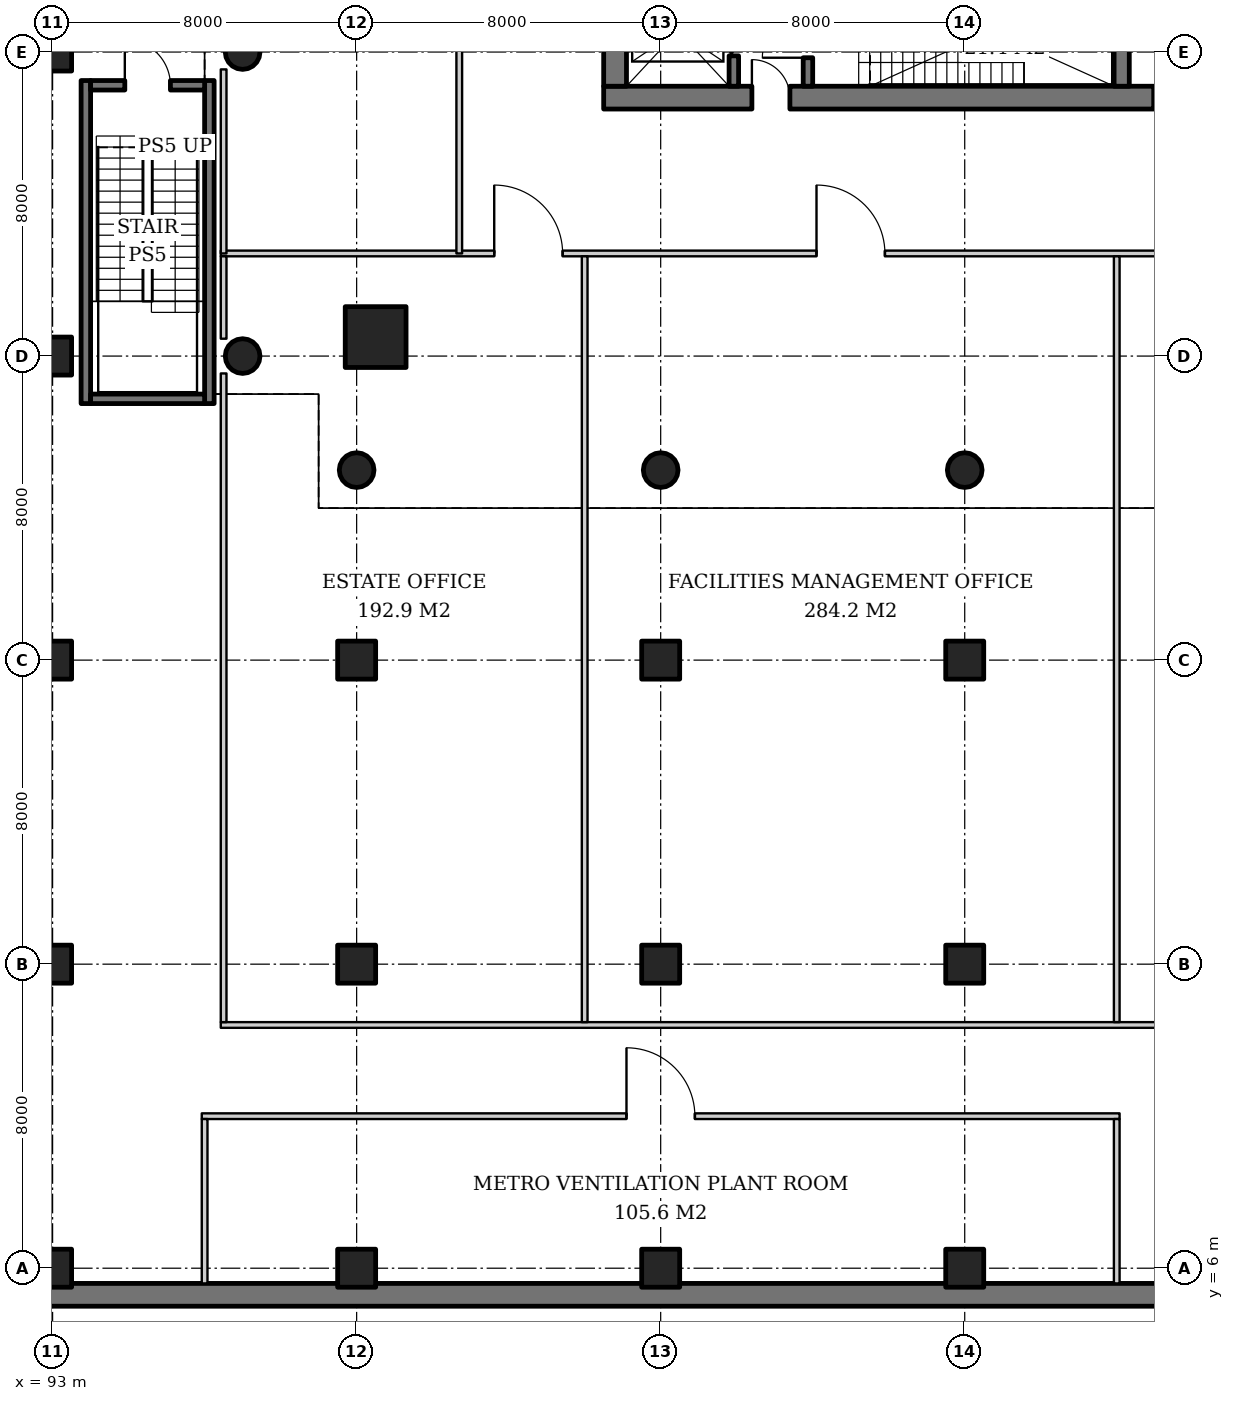
"""IFC4 building model, lengths in metres.
Left out: names, types, materials, properties, quantities, classifications, styles, units other than length and angle.
Written with IfcOpenShell. Run it as: python <this file> out.ifc"""

import sys

from ifc_helpers import new_model, si_unit, direction, frame, frame_2d, origin, origin_2d, place, context, subcontext, project, spatial, rectangle, hollow_circle, extrude, element, fill, save


model = new_model("IFC4")
c1 = context("Model", 3, precision=1e-05, world=origin(), true_north=direction((0.0, 1.0)))
c2 = subcontext(c1, "Body", "Model", "MODEL_VIEW")
j1 = project(units=[si_unit("LENGTHUNIT", "METRE"), si_unit("PLANEANGLEUNIT", "RADIAN")], contexts=[c1])
p1 = place(None, origin())
s1 = spatial("IfcSite", under=j1, at=p1, CompositionType="ELEMENT")
p2 = place(p1, origin())
s2 = spatial("IfcBuilding", under=s1, at=p2, CompositionType="ELEMENT")
p3 = place(p2, frame((0.0, 0.0, -5.0)))
s3 = spatial("IfcBuildingStorey", under=s2, at=p3, CompositionType="ELEMENT", Elevation=-5.0)
for number, where, z_axis, x_axis in (
    (1, (93.0, 6.0, 0.0), (0.0, 0.0, 1.0), (1.0, 0.0, 0.0)),
    (2, (93.0, 14.0, 0.0), (0.0, 0.0, 1.0), (1.0, 0.0, 0.0)),
    (3, (93.0, 22.0, 0.0), (0.0, 0.0, 1.0), (1.0, 0.0, 0.0)),
    (4, (93.0, 30.0, 0.0), (0.0, 0.0, 1.0), (1.0, 0.0, 0.0)),
    (5, (93.0, 38.0, 0.0), (0.0, 0.0, 1.0), (1.0, 0.0, 0.0)),
    (6, (101.0, 6.0, 0.0), (0.0, 0.0, 1.0), (1.0, 0.0, 0.0)),
    (7, (101.0, 14.0, 0.0), (0.0, 0.0, 1.0), (1.0, 0.0, 0.0)),
    (8, (101.0, 22.0, 0.0), (0.0, 0.0, 1.0), (1.0, 0.0, 0.0)),
    (9, (109.0, 6.0, 0.0), (0.0, 0.0, 1.0), (1.0, 0.0, 0.0)),
    (10, (109.0, 14.0, 0.0), (0.0, 0.0, 1.0), (1.0, 0.0, 0.0)),
    (11, (109.0, 22.0, 0.0), (0.0, 0.0, 1.0), (1.0, 0.0, 0.0)),
    (12, (117.0, 6.0, 0.0), (0.0, 0.0, 1.0), (1.0, 0.0, 0.0)),
    (13, (117.0, 14.0, 0.0), (0.0, 0.0, 1.0), (1.0, 0.0, 0.0)),
    (14, (117.0, 22.0, 0.0), (0.0, 0.0, 1.0), (1.0, 0.0, 0.0)),
):
    element("IfcColumn", number, at=place(p3, frame(where, z_axis=z_axis, x_axis=x_axis)), inside=s3, PredefinedType="COLUMN", context=c2, shape_type="SweptSolid", body=[
        extrude(rectangle(XDim=1.0, YDim=1.0, at=origin_2d()), origin(), (0.0, 0.0, 1.0), 5.0),
    ])
p4 = place(p3, frame((85.025, 5.3, 0.0), z_axis=(0.0, 0.0, 1.0), x_axis=(1.0, 0.0, 0.0)))
e15 = element("IfcWall", 15, at=p4, inside=s3, PredefinedType="USERDEFINED", context=c2, shape_type="SweptSolid", body=[
    extrude(rectangle(XDim=56.975, YDim=0.6, at=frame_2d((28.488, 0.0))), origin(), (0.0, 0.0, 1.0), 5.0),
])
p5 = place(p3, frame((101.5, 30.5, 0.0), z_axis=(0.0, 0.0, 1.0), x_axis=(1.0, 0.0, 0.0)))
e16 = element("IfcColumn", 16, at=p5, inside=s3, PredefinedType="COLUMN", context=c2, shape_type="SweptSolid", body=[
    extrude(rectangle(XDim=1.6, YDim=1.6, at=origin_2d()), origin(), (0.0, 0.0, 1.0), 5.0),
])
for number, where, z_axis, x_axis in (
    (17, (98.0, 30.0, 0.0), (0.0, 0.0, 1.0), (1.0, 0.0, 0.0)),
    (18, (98.0, 38.0, 0.0), (0.0, 0.0, 1.0), (1.0, 0.0, 0.0)),
    (19, (101.0, 27.0, 0.0), (0.0, 0.0, 1.0), (1.0, 0.0, 0.0)),
    (20, (109.0, 27.0, 0.0), (0.0, 0.0, 1.0), (1.0, 0.0, 0.0)),
    (21, (117.0, 27.0, 0.0), (0.0, 0.0, 1.0), (1.0, 0.0, 0.0)),
):
    element("IfcColumn", number, at=place(p3, frame(where, z_axis=z_axis, x_axis=x_axis)), inside=s3, PredefinedType="COLUMN", context=c2, shape_type="SweptSolid", body=[
        extrude(hollow_circle(Radius=0.457, WallThickness=0.03, at=origin_2d()), origin(), (0.0, 0.0, 1.0), 5.0),
    ])
p6 = place(p3, frame((107.5, 36.8, 0.0), z_axis=(0.0, 0.0, 1.0), x_axis=(1.0, 0.0, 0.0)))
e22 = element("IfcWall", 22, at=p6, inside=s3, PredefinedType="SHEAR", context=c2, shape_type="SweptSolid", body=[
    extrude(rectangle(XDim=19.0, YDim=0.6, at=frame_2d((9.5, 0.0))), origin(), (0.0, 0.0, 1.0), 5.0),
])
p7 = place(p6, frame((3.9, 0.0, 0.0)))
e23 = element("IfcOpeningElement", 23, at=p7, cuts=e22, PredefinedType="OPENING", context=c2, shape_type="SweptSolid", body=[
    extrude(rectangle(XDim=1.0, YDim=2.1, at=frame_2d((0.5, 1.05))), frame((0.0, 0.31, 0.0), z_axis=(0.0, -1.0, 0.0), x_axis=(1.0, 0.0, 0.0)), (0.0, 0.0, 1.0), 0.62),
])
p8 = place(p6, frame((14.472, 0.0, 0.0)))
e24 = element("IfcOpeningElement", 24, at=p8, cuts=e22, PredefinedType="OPENING", context=c2, shape_type="SweptSolid", body=[
    extrude(rectangle(XDim=1.0, YDim=2.1, at=frame_2d((0.5, 1.05))), frame((0.0, 0.31, 0.0), z_axis=(0.0, -1.0, 0.0), x_axis=(1.0, 0.0, 0.0)), (0.0, 0.0, 1.0), 0.62),
])
p9 = place(p6, frame((16.365, 0.0, 0.0)))
e25 = element("IfcOpeningElement", 25, at=p9, cuts=e22, PredefinedType="OPENING", context=c2, shape_type="SweptSolid", body=[
    extrude(rectangle(XDim=1.0, YDim=2.1, at=frame_2d((0.5, 1.05))), frame((0.0, 0.31, 0.0), z_axis=(0.0, -1.0, 0.0), x_axis=(1.0, 0.0, 0.0)), (0.0, 0.0, 1.0), 0.62),
])
p10 = place(p3, frame((107.8, 37.1, 0.0), z_axis=(0.0, 0.0, 1.0), x_axis=(0.0, 1.0, 0.0)))
e26 = element("IfcWall", 26, at=p10, inside=s3, PredefinedType="SHEAR", context=c2, shape_type="SweptSolid", body=[
    extrude(rectangle(XDim=17.8, YDim=0.6, at=frame_2d((8.9, 0.0))), origin(), (0.0, 0.0, 1.0), 5.0),
])
p11 = place(p10, frame((8.0, 0.0, 0.0)))
e27 = element("IfcOpeningElement", 27, at=p11, cuts=e26, PredefinedType="OPENING", context=c2, shape_type="SweptSolid", body=[
    extrude(rectangle(XDim=1.8, YDim=2.4, at=frame_2d((0.9, 1.2))), frame((0.0, 0.31, 0.0), z_axis=(0.0, -1.0, 0.0), x_axis=(1.0, 0.0, 0.0)), (0.0, 0.0, 1.0), 0.62),
])
p12 = place(p3, frame((121.13, 37.1, 0.0), z_axis=(0.0, 0.0, 1.0), x_axis=(0.0, 1.0, 0.0)))
e28 = element("IfcWall", 28, at=p12, inside=s3, PredefinedType="SHEAR", context=c2, shape_type="SweptSolid", body=[
    extrude(rectangle(XDim=2.9, YDim=0.4, at=frame_2d((1.45, 0.0))), origin(), (0.0, 0.0, 1.0), 5.0),
])
p13 = place(p3, frame((110.925, 37.1, 0.0), z_axis=(0.0, 0.0, 1.0), x_axis=(0.0, 1.0, 0.0)))
e29 = element("IfcWall", 29, at=p13, inside=s3, PredefinedType="SHEAR", context=c2, shape_type="SweptSolid", body=[
    extrude(rectangle(XDim=2.9, YDim=0.25, at=frame_2d((1.45, 0.0))), origin(), (0.0, 0.0, 1.0), 5.0),
])
p14 = place(p13, frame((0.8, 0.0, 0.0)))
e30 = element("IfcOpeningElement", 30, at=p14, cuts=e29, PredefinedType="OPENING", context=c2, shape_type="SweptSolid", body=[
    extrude(rectangle(XDim=1.3, YDim=2.2, at=frame_2d((0.65, 1.1))), frame((0.0, 0.135, 0.0), z_axis=(0.0, -1.0, 0.0), x_axis=(1.0, 0.0, 0.0)), (0.0, 0.0, 1.0), 0.27),
])
p15 = place(p3, frame((112.875, 37.1, 0.0), z_axis=(0.0, 0.0, 1.0), x_axis=(0.0, 1.0, 0.0)))
e31 = element("IfcWall", 31, at=p15, inside=s3, PredefinedType="SHEAR", context=c2, shape_type="SweptSolid", body=[
    extrude(rectangle(XDim=2.9, YDim=0.25, at=frame_2d((1.45, 0.0))), origin(), (0.0, 0.0, 1.0), 5.0),
])
p16 = place(p15, frame((0.75, 0.0, 0.0)))
e32 = element("IfcOpeningElement", 32, at=p16, cuts=e31, PredefinedType="OPENING", context=c2, shape_type="SweptSolid", body=[
    extrude(rectangle(XDim=1.2, YDim=2.1, at=frame_2d((0.6, 1.05))), frame((0.0, 0.135, 0.0), z_axis=(0.0, -1.0, 0.0), x_axis=(1.0, 0.0, 0.0)), (0.0, 0.0, 1.0), 0.27),
])
for number, where, z_axis, x_axis in (
    (33, (93.875, 28.75, 0.0), (0.0, 0.0, 1.0), (0.0, 1.0, 0.0)),
    (34, (97.125, 28.75, 0.0), (0.0, 0.0, 1.0), (0.0, 1.0, 0.0)),
):
    element("IfcWall", number, at=place(p3, frame(where, z_axis=z_axis, x_axis=x_axis)), inside=s3, PredefinedType="SOLIDWALL", context=c2, shape_type="SweptSolid", body=[
        extrude(rectangle(XDim=8.5, YDim=0.25, at=frame_2d((4.25, 0.0))), origin(), (0.0, 0.0, 1.0), 4.6),
    ])
p17 = place(p3, frame((94.0, 28.875, 0.0), z_axis=(0.0, 0.0, 1.0), x_axis=(1.0, 0.0, 0.0)))
e35 = element("IfcWall", 35, at=p17, inside=s3, PredefinedType="SOLIDWALL", context=c2, shape_type="SweptSolid", body=[
    extrude(rectangle(XDim=3.0, YDim=0.25, at=frame_2d((1.5, 0.0))), origin(), (0.0, 0.0, 1.0), 4.6),
])
p18 = place(p3, frame((94.0, 37.125, 0.0), z_axis=(0.0, 0.0, 1.0), x_axis=(1.0, 0.0, 0.0)))
e36 = element("IfcWall", 36, at=p18, inside=s3, PredefinedType="SOLIDWALL", context=c2, shape_type="SweptSolid", body=[
    extrude(rectangle(XDim=3.0, YDim=0.25, at=frame_2d((1.5, 0.0))), origin(), (0.0, 0.0, 1.0), 4.6),
])
p19 = place(p18, frame((0.9, 0.0, 0.0)))
e37 = element("IfcOpeningElement", 37, at=p19, cuts=e36, PredefinedType="OPENING", context=c2, shape_type="SweptSolid", body=[
    extrude(rectangle(XDim=1.2, YDim=2.1, at=frame_2d((0.6, 1.05))), frame((0.0, 0.135, 0.0), z_axis=(0.0, -1.0, 0.0), x_axis=(1.0, 0.0, 0.0)), (0.0, 0.0, 1.0), 0.27),
])
p20 = place(p3, frame((96.925, 10.0, 0.0), z_axis=(0.0, 0.0, 1.0), x_axis=(1.0, 0.0, 0.0)))
e38 = element("IfcWall", 38, at=p20, inside=s3, PredefinedType="PARTITIONING", context=c2, shape_type="SweptSolid", body=[
    extrude(rectangle(XDim=24.15, YDim=0.15, at=frame_2d((12.075, 0.0))), origin(), (0.0, 0.0, 1.0), 4.6),
])
p21 = place(p20, frame((11.175, 0.0, 0.0)))
e39 = element("IfcOpeningElement", 39, at=p21, cuts=e38, PredefinedType="OPENING", context=c2, shape_type="SweptSolid", body=[
    extrude(rectangle(XDim=1.8, YDim=2.4, at=frame_2d((0.9, 1.2))), frame((0.0, 0.085, 0.0), z_axis=(0.0, -1.0, 0.0), x_axis=(1.0, 0.0, 0.0)), (0.0, 0.0, 1.0), 0.17),
])
for number, where, z_axis, x_axis in (
    (40, (97.0, 9.925, 0.0), (0.0, 0.0, 1.0), (0.0, -1.0, 0.0)),
    (41, (121.0, 9.925, 0.0), (0.0, 0.0, 1.0), (0.0, -1.0, 0.0)),
):
    element("IfcWall", number, at=place(p3, frame(where, z_axis=z_axis, x_axis=x_axis)), inside=s3, PredefinedType="PARTITIONING", context=c2, shape_type="SweptSolid", body=[
        extrude(rectangle(XDim=4.325, YDim=0.15, at=frame_2d((2.163, 0.0))), origin(), (0.0, 0.0, 1.0), 4.6),
    ])
p22 = place(p3, frame((97.425, 12.4, 0.0), z_axis=(0.0, 0.0, 1.0), x_axis=(1.0, 0.0, 0.0)))
e42 = element("IfcWall", 42, at=p22, inside=s3, PredefinedType="PARTITIONING", context=c2, shape_type="SweptSolid", body=[
    extrude(rectangle(XDim=35.15, YDim=0.15, at=frame_2d((17.575, 0.0))), origin(), (0.0, 0.0, 1.0), 4.6),
])
p23 = place(p3, frame((97.425, 32.7, 0.0), z_axis=(0.0, 0.0, 1.0), x_axis=(1.0, 0.0, 0.0)))
e43 = element("IfcWall", 43, at=p23, inside=s3, PredefinedType="PARTITIONING", context=c2, shape_type="SweptSolid", body=[
    extrude(rectangle(XDim=35.15, YDim=0.15, at=frame_2d((17.575, 0.0))), origin(), (0.0, 0.0, 1.0), 3.9),
])
p24 = place(p23, frame((7.195, 0.0, 0.0)))
e44 = element("IfcOpeningElement", 44, at=p24, cuts=e43, PredefinedType="OPENING", context=c2, shape_type="SweptSolid", body=[
    extrude(rectangle(XDim=1.8, YDim=2.4, at=frame_2d((0.9, 1.2))), frame((0.0, 0.085, 0.0), z_axis=(0.0, -1.0, 0.0), x_axis=(1.0, 0.0, 0.0)), (0.0, 0.0, 1.0), 0.17),
])
p25 = place(p23, frame((15.675, 0.0, 0.0)))
e45 = element("IfcOpeningElement", 45, at=p25, cuts=e43, PredefinedType="OPENING", context=c2, shape_type="SweptSolid", body=[
    extrude(rectangle(XDim=1.8, YDim=2.4, at=frame_2d((0.9, 1.2))), frame((0.0, 0.085, 0.0), z_axis=(0.0, -1.0, 0.0), x_axis=(1.0, 0.0, 0.0)), (0.0, 0.0, 1.0), 0.17),
])
p26 = place(p23, frame((28.425, 0.0, 0.0)))
e46 = element("IfcOpeningElement", 46, at=p26, cuts=e43, PredefinedType="OPENING", context=c2, shape_type="SweptSolid", body=[
    extrude(rectangle(XDim=1.8, YDim=2.4, at=frame_2d((0.9, 1.2))), frame((0.0, 0.085, 0.0), z_axis=(0.0, -1.0, 0.0), x_axis=(1.0, 0.0, 0.0)), (0.0, 0.0, 1.0), 0.17),
])
p27 = place(p3, frame((97.5, 12.475, 0.0), z_axis=(0.0, 0.0, 1.0), x_axis=(0.0, 1.0, 0.0)))
e47 = element("IfcWall", 47, at=p27, inside=s3, PredefinedType="PARTITIONING", context=c2, shape_type="SweptSolid", body=[
    extrude(rectangle(XDim=17.068, YDim=0.15, at=frame_2d((8.534, 0.0))), origin(), (0.0, 0.0, 1.0), 4.6),
])
p28 = place(p3, frame((97.5, 30.457, 0.0), z_axis=(0.0, 0.0, 1.0), x_axis=(0.0, 1.0, 0.0)))
e48 = element("IfcWall", 48, at=p28, inside=s3, PredefinedType="PARTITIONING", context=c2, shape_type="SweptSolid", body=[
    extrude(rectangle(XDim=2.168, YDim=0.15, at=frame_2d((1.084, 0.0))), origin(), (0.0, 0.0, 1.0), 4.7),
])
for number, where, z_axis, x_axis in (
    (49, (107.0, 12.475, 0.0), (0.0, 0.0, 1.0), (0.0, 1.0, 0.0)),
    (50, (121.0, 12.475, 0.0), (0.0, 0.0, 1.0), (0.0, 1.0, 0.0)),
):
    element("IfcWall", number, at=place(p3, frame(where, z_axis=z_axis, x_axis=x_axis)), inside=s3, PredefinedType="PARTITIONING", context=c2, shape_type="SweptSolid", body=[
        extrude(rectangle(XDim=20.15, YDim=0.15, at=frame_2d((10.075, 0.0))), origin(), (0.0, 0.0, 1.0), 4.15),
    ])
p29 = place(p3, frame((97.5, 32.7, 0.0), z_axis=(0.0, 0.0, 1.0), x_axis=(0.0, 1.0, 0.0)))
e51 = element("IfcWall", 51, at=p29, inside=s3, PredefinedType="PARTITIONING", context=c2, shape_type="SweptSolid", body=[
    extrude(rectangle(XDim=4.843, YDim=0.15, at=frame_2d((2.421, 0.0))), origin(), (0.0, 0.0, 1.0), 4.7),
])
p30 = place(p3, frame((103.7, 32.7, 0.0), z_axis=(0.0, 0.0, 1.0), x_axis=(0.0, 1.0, 0.0)))
e52 = element("IfcWall", 52, at=p30, inside=s3, PredefinedType="PARTITIONING", context=c2, shape_type="SweptSolid", body=[
    extrude(rectangle(XDim=26.6, YDim=0.15, at=frame_2d((13.3, 0.0))), origin(), (0.0, 0.0, 1.0), 3.9),
])
p31 = place(p30, frame((5.75, 0.0, 0.0)))
e53 = element("IfcOpeningElement", 53, at=p31, cuts=e52, PredefinedType="OPENING", context=c2, shape_type="SweptSolid", body=[
    extrude(rectangle(XDim=1.8, YDim=2.4, at=frame_2d((0.9, 1.2))), frame((0.0, 0.085, 0.0), z_axis=(0.0, -1.0, 0.0), x_axis=(1.0, 0.0, 0.0)), (0.0, 0.0, 1.0), 0.17),
])
p32 = place(p30, frame((19.05, 0.0, 0.0)))
e54 = element("IfcOpeningElement", 54, at=p32, cuts=e52, PredefinedType="OPENING", context=c2, shape_type="SweptSolid", body=[
    extrude(rectangle(XDim=1.8, YDim=2.4, at=frame_2d((0.9, 1.2))), frame((0.0, 0.085, 0.0), z_axis=(0.0, -1.0, 0.0), x_axis=(1.0, 0.0, 0.0)), (0.0, 0.0, 1.0), 0.17),
])
p33 = place(p14, origin())
e55 = element("IfcDoor", 55, at=p33, inside=s3, OperationType="DOUBLE_DOOR_SLIDING", PredefinedType="DOOR", context=c2, shape_type="SweptSolid", body=[
    extrude(rectangle(XDim=1.3, YDim=2.2, at=frame_2d((0.65, 1.1))), frame((0.0, 0.025, 0.0), z_axis=(0.0, -1.0, 0.0), x_axis=(1.0, 0.0, 0.0)), (0.0, 0.0, 1.0), 0.05),
])
fill(e30, e55)
p34 = place(p16, origin())
e56 = element("IfcDoor", 56, at=p34, inside=s3, OperationType="SINGLE_SWING_LEFT", PredefinedType="DOOR", context=c2, shape_type="SweptSolid", body=[
    extrude(rectangle(XDim=1.2, YDim=2.1, at=frame_2d((0.6, 1.05))), frame((0.0, 0.025, 0.0), z_axis=(0.0, -1.0, 0.0), x_axis=(1.0, 0.0, 0.0)), (0.0, 0.0, 1.0), 0.05),
])
fill(e32, e56)
p35 = place(p7, origin())
e57 = element("IfcDoor", 57, at=p35, inside=s3, OperationType="SINGLE_SWING_LEFT", PredefinedType="DOOR", context=c2, shape_type="SweptSolid", body=[
    extrude(rectangle(XDim=1.0, YDim=2.1, at=frame_2d((0.5, 1.05))), frame((0.0, 0.025, 0.0), z_axis=(0.0, -1.0, 0.0), x_axis=(1.0, 0.0, 0.0)), (0.0, 0.0, 1.0), 0.05),
])
fill(e23, e57)
p36 = place(p8, origin())
e58 = element("IfcDoor", 58, at=p36, inside=s3, OperationType="SINGLE_SWING_RIGHT", PredefinedType="DOOR", context=c2, shape_type="SweptSolid", body=[
    extrude(rectangle(XDim=1.0, YDim=2.1, at=frame_2d((0.5, 1.05))), frame((0.0, 0.29, 0.0), z_axis=(0.0, -1.0, 0.0), x_axis=(1.0, 0.0, 0.0)), (0.0, 0.0, 1.0), 0.05),
])
fill(e24, e58)
p37 = place(p19, origin())
e59 = element("IfcDoor", 59, at=p37, inside=s3, OperationType="SINGLE_SWING_LEFT", PredefinedType="DOOR", context=c2, shape_type="SweptSolid", body=[
    extrude(rectangle(XDim=1.2, YDim=2.1, at=frame_2d((0.6, 1.05))), frame((0.0, 0.025, 0.0), z_axis=(0.0, -1.0, 0.0), x_axis=(1.0, 0.0, 0.0)), (0.0, 0.0, 1.0), 0.05),
])
fill(e37, e59)
p38 = place(p21, origin())
e60 = element("IfcDoor", 60, at=p38, inside=s3, OperationType="DOUBLE_DOOR_SINGLE_SWING", PredefinedType="DOOR", context=c2, shape_type="SweptSolid", body=[
    extrude(rectangle(XDim=1.8, YDim=2.4, at=frame_2d((0.9, 1.2))), frame((0.0, 0.025, 0.0), z_axis=(0.0, -1.0, 0.0), x_axis=(1.0, 0.0, 0.0)), (0.0, 0.0, 1.0), 0.05),
])
fill(e39, e60)
p39 = place(p24, origin())
e61 = element("IfcDoor", 61, at=p39, inside=s3, OperationType="DOUBLE_DOOR_SINGLE_SWING", PredefinedType="DOOR", context=c2, shape_type="SweptSolid", body=[
    extrude(rectangle(XDim=1.8, YDim=2.4, at=frame_2d((0.9, 1.2))), frame((0.0, 0.025, 0.0), z_axis=(0.0, -1.0, 0.0), x_axis=(1.0, 0.0, 0.0)), (0.0, 0.0, 1.0), 0.05),
])
fill(e44, e61)
p40 = place(p25, origin())
e62 = element("IfcDoor", 62, at=p40, inside=s3, OperationType="DOUBLE_DOOR_SINGLE_SWING", PredefinedType="DOOR", context=c2, shape_type="SweptSolid", body=[
    extrude(rectangle(XDim=1.8, YDim=2.4, at=frame_2d((0.9, 1.2))), frame((0.0, 0.025, 0.0), z_axis=(0.0, -1.0, 0.0), x_axis=(1.0, 0.0, 0.0)), (0.0, 0.0, 1.0), 0.05),
])
fill(e45, e62)
save(model, sys.argv[1])
